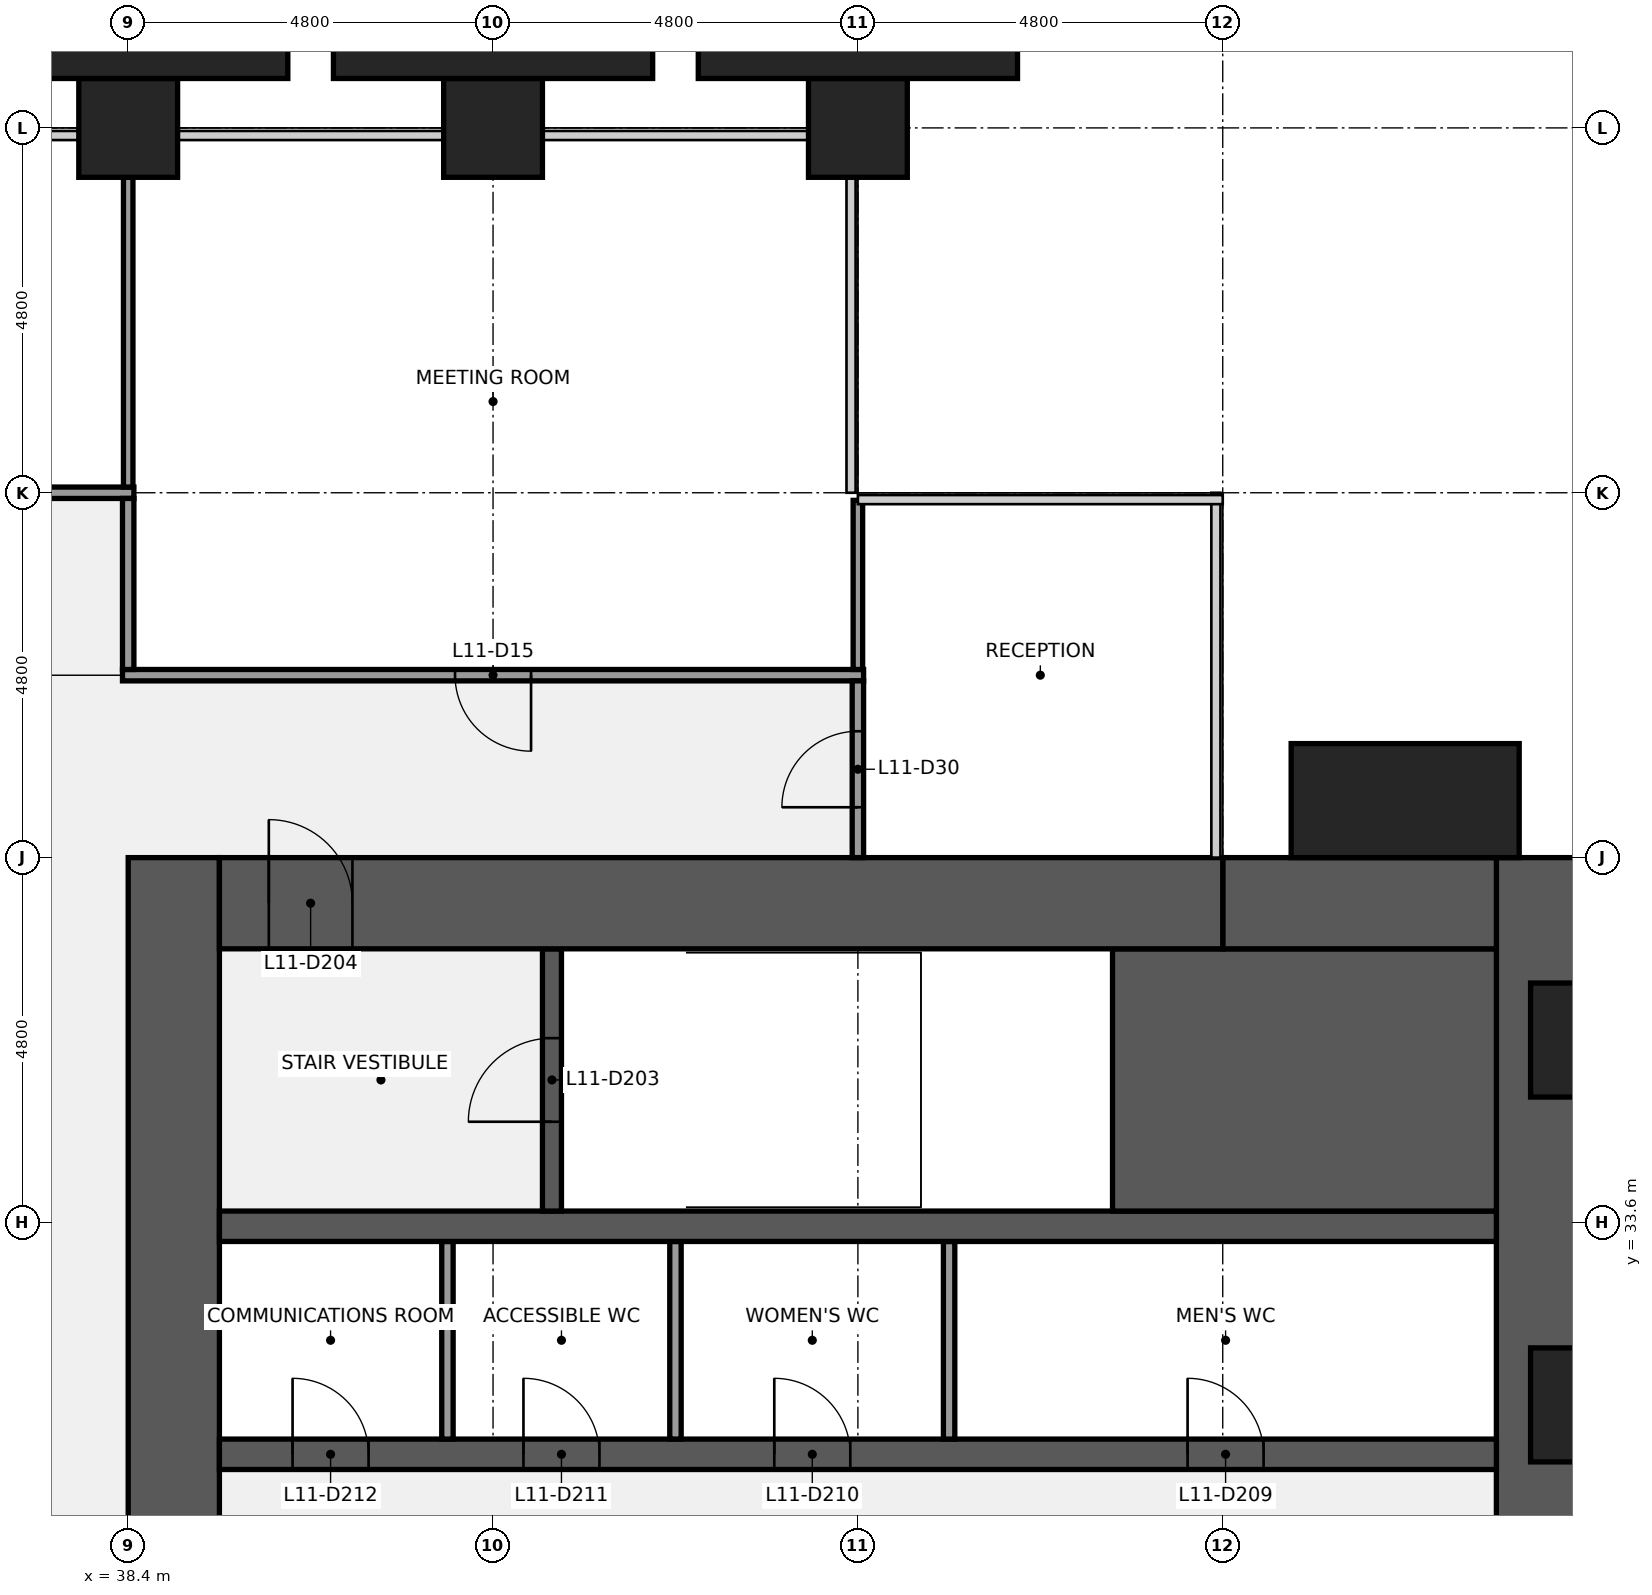
"""IFC4 building model, lengths in metres.
Left out: names, types, materials, properties, quantities, classifications, styles, units other than length and angle.
Written with IfcOpenShell. Run it as: python <this file> out.ifc"""

import sys

from ifc_helpers import new_model, si_unit, direction, frame, frame_2d, origin, origin_2d, place, context, subcontext, project, spatial, rectangle, extrude, element, fill, save


model = new_model("IFC4")
c1 = context("Model", 3, precision=1e-05, world=origin(), true_north=direction((0.0, 1.0)))
c2 = subcontext(c1, "Body", "Model", "MODEL_VIEW")
j1 = project(units=[si_unit("LENGTHUNIT", "METRE"), si_unit("PLANEANGLEUNIT", "RADIAN")], contexts=[c1])
p1 = place(None, origin())
s1 = spatial("IfcSite", under=j1, at=p1, CompositionType="ELEMENT")
p2 = place(p1, origin())
s2 = spatial("IfcBuilding", under=s1, at=p2, CompositionType="ELEMENT")
p3 = place(p2, frame((0.0, 0.0, 55.0)))
s3 = spatial("IfcBuildingStorey", under=s2, at=p3, CompositionType="ELEMENT", Elevation=55.0)
for number, where, z_axis, x_axis in (
    (1, (38.4, 48.0, 0.0), (0.0, 0.0, 1.0), (1.0, 0.0, 0.0)),
    (2, (43.2, 48.0, 0.0), (0.0, 0.0, 1.0), (1.0, 0.0, 0.0)),
    (3, (48.0, 48.0, 0.0), (0.0, 0.0, 1.0), (1.0, 0.0, 0.0)),
):
    element("IfcColumn", number, at=place(p3, frame(where, z_axis=z_axis, x_axis=x_axis)), inside=s3, PredefinedType="COLUMN", context=c2, shape_type="SweptSolid", body=[
        extrude(rectangle(XDim=1.3, YDim=1.3, at=origin_2d()), origin(), (0.0, 0.0, 1.0), 4.0),
    ])
p4 = place(p3, frame((57.0, 38.4, 0.0), z_axis=(0.0, 0.0, 1.0), x_axis=(0.0, -1.0, 0.0)))
e4 = element("IfcWall", 4, at=p4, inside=s3, PredefinedType="SHEAR", context=c2, shape_type="SweptSolid", body=[
    extrude(rectangle(XDim=28.8, YDim=1.2, at=frame_2d((14.4, 0.0))), origin(), (0.0, 0.0, 1.0), 3.84),
])
p5 = place(p4, frame((18.45, 0.0, 0.9)))
e5 = element("IfcOpeningElement", 5, at=p5, cuts=e4, PredefinedType="OPENING", context=c2, shape_type="SweptSolid", body=[
    extrude(rectangle(XDim=1.5, YDim=1.5, at=frame_2d((0.75, 0.75))), frame((0.0, 0.61, 0.0), z_axis=(0.0, -1.0, 0.0), x_axis=(1.0, 0.0, 0.0)), (0.0, 0.0, 1.0), 1.22),
])
p6 = place(p4, frame((8.85, 0.0, 0.9)))
e6 = element("IfcOpeningElement", 6, at=p6, cuts=e4, PredefinedType="OPENING", context=c2, shape_type="SweptSolid", body=[
    extrude(rectangle(XDim=1.5, YDim=1.5, at=frame_2d((0.75, 0.75))), frame((0.0, 0.61, 0.0), z_axis=(0.0, -1.0, 0.0), x_axis=(1.0, 0.0, 0.0)), (0.0, 0.0, 1.0), 1.22),
])
p7 = place(p3, frame((39.0, 9.6, 0.0), z_axis=(0.0, 0.0, 1.0), x_axis=(0.0, 1.0, 0.0)))
e7 = element("IfcWall", 7, at=p7, inside=s3, PredefinedType="SHEAR", context=c2, shape_type="SweptSolid", body=[
    extrude(rectangle(XDim=28.8, YDim=1.2, at=frame_2d((14.4, 0.0))), origin(), (0.0, 0.0, 1.0), 3.84),
])
p8 = place(p7, frame((8.7, 0.0, 0.0)))
e8 = element("IfcOpeningElement", 8, at=p8, cuts=e7, PredefinedType="OPENING", context=c2, shape_type="SweptSolid", body=[
    extrude(rectangle(XDim=1.8, YDim=2.1, at=frame_2d((0.9, 1.05))), frame((0.0, 0.61, 0.0), z_axis=(0.0, -1.0, 0.0), x_axis=(1.0, 0.0, 0.0)), (0.0, 0.0, 1.0), 1.22),
])
p9 = place(p7, frame((18.3, 0.0, 0.0)))
e9 = element("IfcOpeningElement", 9, at=p9, cuts=e7, PredefinedType="OPENING", context=c2, shape_type="SweptSolid", body=[
    extrude(rectangle(XDim=1.8, YDim=2.1, at=frame_2d((0.9, 1.05))), frame((0.0, 0.61, 0.0), z_axis=(0.0, -1.0, 0.0), x_axis=(1.0, 0.0, 0.0)), (0.0, 0.0, 1.0), 1.22),
])
p10 = place(p3, frame((39.6, 30.55, 0.0), z_axis=(0.0, 0.0, 1.0), x_axis=(1.0, 0.0, 0.0)))
e10 = element("IfcWall", 10, at=p10, inside=s3, PredefinedType="SHEAR", context=c2, shape_type="SweptSolid", body=[
    extrude(rectangle(XDim=16.8, YDim=0.4, at=frame_2d((8.4, 0.0))), origin(), (0.0, 0.0, 1.0), 3.84),
])
p11 = place(p10, frame((12.738, 0.0, 0.0)))
e11 = element("IfcOpeningElement", 11, at=p11, cuts=e10, PredefinedType="OPENING", context=c2, shape_type="SweptSolid", body=[
    extrude(rectangle(XDim=1.0, YDim=2.1, at=frame_2d((0.5, 1.05))), frame((0.0, 0.21, 0.0), z_axis=(0.0, -1.0, 0.0), x_axis=(1.0, 0.0, 0.0)), (0.0, 0.0, 1.0), 0.42),
])
p12 = place(p10, frame((7.3, 0.0, 0.0)))
e12 = element("IfcOpeningElement", 12, at=p12, cuts=e10, PredefinedType="OPENING", context=c2, shape_type="SweptSolid", body=[
    extrude(rectangle(XDim=1.0, YDim=2.1, at=frame_2d((0.5, 1.05))), frame((0.0, 0.21, 0.0), z_axis=(0.0, -1.0, 0.0), x_axis=(1.0, 0.0, 0.0)), (0.0, 0.0, 1.0), 0.42),
])
p13 = place(p10, frame((4.0, 0.0, 0.0)))
e13 = element("IfcOpeningElement", 13, at=p13, cuts=e10, PredefinedType="OPENING", context=c2, shape_type="SweptSolid", body=[
    extrude(rectangle(XDim=1.0, YDim=2.1, at=frame_2d((0.5, 1.05))), frame((0.0, 0.21, 0.0), z_axis=(0.0, -1.0, 0.0), x_axis=(1.0, 0.0, 0.0)), (0.0, 0.0, 1.0), 0.42),
])
p14 = place(p10, frame((0.962, 0.0, 0.0)))
e14 = element("IfcOpeningElement", 14, at=p14, cuts=e10, PredefinedType="OPENING", context=c2, shape_type="SweptSolid", body=[
    extrude(rectangle(XDim=1.0, YDim=2.1, at=frame_2d((0.5, 1.05))), frame((0.0, 0.21, 0.0), z_axis=(0.0, -1.0, 0.0), x_axis=(1.0, 0.0, 0.0)), (0.0, 0.0, 1.0), 0.42),
])
for number, where, z_axis, x_axis in (
    (15, (49.2, 30.75, 0.0), (0.0, 0.0, 1.0), (0.0, 1.0, 0.0)),
    (16, (45.6, 30.75, 0.0), (0.0, 0.0, 1.0), (0.0, 1.0, 0.0)),
    (17, (42.6, 30.75, 0.0), (0.0, 0.0, 1.0), (0.0, 1.0, 0.0)),
):
    element("IfcWall", number, at=place(p3, frame(where, z_axis=z_axis, x_axis=x_axis)), inside=s3, PredefinedType="PARTITIONING", context=c2, shape_type="SweptSolid", body=[
        extrude(rectangle(XDim=2.6, YDim=0.15, at=frame_2d((1.3, 0.0))), origin(), (0.0, 0.0, 1.0), 3.84),
    ])
p15 = place(p3, frame((39.6, 33.55, 0.0), z_axis=(0.0, 0.0, 1.0), x_axis=(1.0, 0.0, 0.0)))
e18 = element("IfcWall", 18, at=p15, inside=s3, PredefinedType="SHEAR", context=c2, shape_type="SweptSolid", body=[
    extrude(rectangle(XDim=16.8, YDim=0.4, at=frame_2d((8.4, 0.0))), origin(), (0.0, 0.0, 1.0), 3.84),
])
p16 = place(p3, frame((51.35, 35.475, 0.0), z_axis=(0.0, 0.0, 1.0), x_axis=(1.0, 0.0, 0.0)))
e19 = element("IfcWall", 19, at=p16, inside=s3, PredefinedType="SHEAR", context=c2, shape_type="SweptSolid", body=[
    extrude(rectangle(XDim=5.05, YDim=3.45, at=frame_2d((2.525, 0.0))), origin(), (0.0, 0.0, 1.0), 3.84),
])
p17 = place(p3, frame((43.975, 33.75, 0.0), z_axis=(0.0, 0.0, 1.0), x_axis=(0.0, 1.0, 0.0)))
e20 = element("IfcWall", 20, at=p17, inside=s3, PredefinedType="SHEAR", context=c2, shape_type="SweptSolid", body=[
    extrude(rectangle(XDim=3.45, YDim=0.25, at=frame_2d((1.725, 0.0))), origin(), (0.0, 0.0, 1.0), 3.84),
])
p18 = place(p17, frame((1.175, 0.0, 0.0)))
e21 = element("IfcOpeningElement", 21, at=p18, cuts=e20, PredefinedType="OPENING", context=c2, shape_type="SweptSolid", body=[
    extrude(rectangle(XDim=1.1, YDim=2.1, at=frame_2d((0.55, 1.05))), frame((0.0, 0.135, 0.0), z_axis=(0.0, -1.0, 0.0), x_axis=(1.0, 0.0, 0.0)), (0.0, 0.0, 1.0), 0.27),
])
p19 = place(p3, frame((52.8, 37.8, 0.0), z_axis=(0.0, 0.0, 1.0), x_axis=(1.0, 0.0, 0.0)))
e22 = element("IfcWall", 22, at=p19, inside=s3, PredefinedType="SHEAR", context=c2, shape_type="SweptSolid", body=[
    extrude(rectangle(XDim=3.6, YDim=1.2, at=frame_2d((1.8, 0.0))), origin(), (0.0, 0.0, 1.0), 3.84),
])
p20 = place(p3, frame((39.6, 37.8, 0.0), z_axis=(0.0, 0.0, 1.0), x_axis=(1.0, 0.0, 0.0)))
e23 = element("IfcWall", 23, at=p20, inside=s3, PredefinedType="SHEAR", context=c2, shape_type="SweptSolid", body=[
    extrude(rectangle(XDim=13.2, YDim=1.2, at=frame_2d((6.6, 0.0))), origin(), (0.0, 0.0, 1.0), 3.84),
])
p21 = place(p20, frame((0.65, 0.0, 0.0)))
e24 = element("IfcOpeningElement", 24, at=p21, cuts=e23, PredefinedType="OPENING", context=c2, shape_type="SweptSolid", body=[
    extrude(rectangle(XDim=1.1, YDim=2.1, at=frame_2d((0.55, 1.05))), frame((0.0, 0.61, 0.0), z_axis=(0.0, -1.0, 0.0), x_axis=(1.0, 0.0, 0.0)), (0.0, 0.0, 1.0), 1.22),
])
p22 = place(p3, frame((38.325, 40.8, 0.0), z_axis=(0.0, 0.0, 1.0), x_axis=(1.0, 0.0, 0.0)))
e25 = element("IfcWall", 25, at=p22, inside=s3, PredefinedType="PARTITIONING", context=c2, shape_type="SweptSolid", body=[
    extrude(rectangle(XDim=9.75, YDim=0.15, at=frame_2d((4.875, 0.0))), origin(), (0.0, 0.0, 1.0), 2.849),
])
p23 = place(p22, frame((4.375, 0.0, 0.0)))
e26 = element("IfcOpeningElement", 26, at=p23, cuts=e25, PredefinedType="OPENING", context=c2, shape_type="SweptSolid", body=[
    extrude(rectangle(XDim=1.0, YDim=2.1, at=frame_2d((0.5, 1.05))), frame((0.0, 0.085, 0.0), z_axis=(0.0, -1.0, 0.0), x_axis=(1.0, 0.0, 0.0)), (0.0, 0.0, 1.0), 0.17),
])
p24 = place(p3, frame((19.125, 43.2, 0.0), z_axis=(0.0, 0.0, 1.0), x_axis=(1.0, 0.0, 0.0)))
e27 = element("IfcWall", 27, at=p24, inside=s3, PredefinedType="PARTITIONING", context=c2, shape_type="SweptSolid", body=[
    extrude(rectangle(XDim=19.35, YDim=0.15, at=frame_2d((9.675, 0.0))), origin(), (0.0, 0.0, 1.0), 2.849),
])
p25 = place(p24, frame((4.375, 0.0, 0.0)))
e28 = element("IfcOpeningElement", 28, at=p25, cuts=e27, PredefinedType="OPENING", context=c2, shape_type="SweptSolid", body=[
    extrude(rectangle(XDim=1.0, YDim=2.1, at=frame_2d((0.5, 1.05))), frame((0.0, 0.085, 0.0), z_axis=(0.0, -1.0, 0.0), x_axis=(1.0, 0.0, 0.0)), (0.0, 0.0, 1.0), 0.17),
])
p26 = place(p24, frame((10.375, 0.0, 0.0)))
e29 = element("IfcOpeningElement", 29, at=p26, cuts=e27, PredefinedType="OPENING", context=c2, shape_type="SweptSolid", body=[
    extrude(rectangle(XDim=1.0, YDim=2.1, at=frame_2d((0.5, 1.05))), frame((0.0, 0.085, 0.0), z_axis=(0.0, -1.0, 0.0), x_axis=(1.0, 0.0, 0.0)), (0.0, 0.0, 1.0), 0.17),
])
p27 = place(p24, frame((15.175, 0.0, 0.0)))
e30 = element("IfcOpeningElement", 30, at=p27, cuts=e27, PredefinedType="OPENING", context=c2, shape_type="SweptSolid", body=[
    extrude(rectangle(XDim=1.0, YDim=2.1, at=frame_2d((0.5, 1.05))), frame((0.0, 0.085, 0.0), z_axis=(0.0, -1.0, 0.0), x_axis=(1.0, 0.0, 0.0)), (0.0, 0.0, 1.0), 0.17),
])
p28 = place(p3, frame((38.4, 43.275, 0.0), z_axis=(0.0, 0.0, 1.0), x_axis=(0.0, 1.0, 0.0)))
e31 = element("IfcWall", 31, at=p28, inside=s3, PredefinedType="PARTITIONING", context=c2, shape_type="SweptSolid", body=[
    extrude(rectangle(XDim=4.075, YDim=0.125, at=frame_2d((2.038, 0.0))), origin(), (0.0, 0.0, 1.0), 2.849),
])
p29 = place(p3, frame((38.4, 40.875, 0.0), z_axis=(0.0, 0.0, 1.0), x_axis=(0.0, 1.0, 0.0)))
e32 = element("IfcWall", 32, at=p29, inside=s3, PredefinedType="PARTITIONING", context=c2, shape_type="SweptSolid", body=[
    extrude(rectangle(XDim=2.25, YDim=0.15, at=frame_2d((1.125, 0.0))), origin(), (0.0, 0.0, 1.0), 2.849),
])
p30 = place(p3, frame((48.0, 40.875, 0.0), z_axis=(0.0, 0.0, 1.0), x_axis=(0.0, 1.0, 0.0)))
e33 = element("IfcWall", 33, at=p30, inside=s3, PredefinedType="PARTITIONING", context=c2, shape_type="SweptSolid", body=[
    extrude(rectangle(XDim=2.225, YDim=0.125, at=frame_2d((1.113, 0.0))), origin(), (0.0, 0.0, 1.0), 2.849),
])
p31 = place(p3, frame((48.0, 38.4, 0.0), z_axis=(0.0, 0.0, 1.0), x_axis=(0.0, 1.0, 0.0)))
e34 = element("IfcWall", 34, at=p31, inside=s3, PredefinedType="PARTITIONING", context=c2, shape_type="SweptSolid", body=[
    extrude(rectangle(XDim=2.325, YDim=0.15, at=frame_2d((1.163, 0.0))), origin(), (0.0, 0.0, 1.0), 2.849),
])
p32 = place(p31, frame((0.663, 0.0, 0.0)))
e35 = element("IfcOpeningElement", 35, at=p32, cuts=e34, PredefinedType="OPENING", context=c2, shape_type="SweptSolid", body=[
    extrude(rectangle(XDim=1.0, YDim=2.1, at=frame_2d((0.5, 1.05))), frame((0.0, 0.085, 0.0), z_axis=(0.0, -1.0, 0.0), x_axis=(1.0, 0.0, 0.0)), (0.0, 0.0, 1.0), 0.17),
])
p33 = place(p3, frame((55.2, 39.15, 0.0), z_axis=(0.0, 0.0, 1.0), x_axis=(1.0, 0.0, 0.0)))
e36 = element("IfcColumn", 36, at=p33, inside=s3, PredefinedType="PILASTER", context=c2, shape_type="SweptSolid", body=[
    extrude(rectangle(XDim=3.0, YDim=1.5, at=origin_2d()), origin(), (0.0, 0.0, 1.0), 4.0),
])
for number, where, z_axis, x_axis in (
    (37, (38.4, 49.075, 0.0), (0.0, 0.0, 1.0), (1.0, 0.0, 0.0)),
    (38, (43.2, 49.075, 0.0), (0.0, 0.0, 1.0), (1.0, 0.0, 0.0)),
    (39, (48.0, 49.075, 0.0), (0.0, 0.0, 1.0), (1.0, 0.0, 0.0)),
):
    element("IfcColumn", number, at=place(p3, frame(where, z_axis=z_axis, x_axis=x_axis)), inside=s3, PredefinedType="PILASTER", context=c2, shape_type="SweptSolid", body=[
        extrude(rectangle(XDim=4.2, YDim=0.85, at=origin_2d()), origin(), (0.0, 0.0, 1.0), 4.0),
    ])
p34 = place(p18, origin())
e40 = element("IfcDoor", 40, at=p34, inside=s3, OperationType="SINGLE_SWING_LEFT", PredefinedType="DOOR", context=c2, shape_type="SweptSolid", body=[
    extrude(rectangle(XDim=1.1, YDim=2.1, at=frame_2d((0.55, 1.05))), frame((0.0, 0.025, 0.0), z_axis=(0.0, -1.0, 0.0), x_axis=(1.0, 0.0, 0.0)), (0.0, 0.0, 1.0), 0.05),
])
fill(e21, e40)
p35 = place(p21, origin())
e41 = element("IfcDoor", 41, at=p35, inside=s3, OperationType="SINGLE_SWING_LEFT", PredefinedType="DOOR", context=c2, shape_type="SweptSolid", body=[
    extrude(rectangle(XDim=1.1, YDim=2.1, at=frame_2d((0.55, 1.05))), frame((0.0, 0.025, 0.0), z_axis=(0.0, -1.0, 0.0), x_axis=(1.0, 0.0, 0.0)), (0.0, 0.0, 1.0), 0.05),
])
fill(e24, e41)
p36 = place(p11, origin())
e42 = element("IfcDoor", 42, at=p36, inside=s3, OperationType="SINGLE_SWING_LEFT", PredefinedType="DOOR", context=c2, shape_type="SweptSolid", body=[
    extrude(rectangle(XDim=1.0, YDim=2.1, at=frame_2d((0.5, 1.05))), frame((0.0, 0.025, 0.0), z_axis=(0.0, -1.0, 0.0), x_axis=(1.0, 0.0, 0.0)), (0.0, 0.0, 1.0), 0.05),
])
fill(e11, e42)
p37 = place(p12, origin())
e43 = element("IfcDoor", 43, at=p37, inside=s3, OperationType="SINGLE_SWING_LEFT", PredefinedType="DOOR", context=c2, shape_type="SweptSolid", body=[
    extrude(rectangle(XDim=1.0, YDim=2.1, at=frame_2d((0.5, 1.05))), frame((0.0, 0.025, 0.0), z_axis=(0.0, -1.0, 0.0), x_axis=(1.0, 0.0, 0.0)), (0.0, 0.0, 1.0), 0.05),
])
fill(e12, e43)
p38 = place(p13, origin())
e44 = element("IfcDoor", 44, at=p38, inside=s3, OperationType="SINGLE_SWING_LEFT", PredefinedType="DOOR", context=c2, shape_type="SweptSolid", body=[
    extrude(rectangle(XDim=1.0, YDim=2.1, at=frame_2d((0.5, 1.05))), frame((0.0, 0.025, 0.0), z_axis=(0.0, -1.0, 0.0), x_axis=(1.0, 0.0, 0.0)), (0.0, 0.0, 1.0), 0.05),
])
fill(e13, e44)
p39 = place(p14, origin())
e45 = element("IfcDoor", 45, at=p39, inside=s3, OperationType="SINGLE_SWING_LEFT", PredefinedType="DOOR", context=c2, shape_type="SweptSolid", body=[
    extrude(rectangle(XDim=1.0, YDim=2.1, at=frame_2d((0.5, 1.05))), frame((0.0, 0.025, 0.0), z_axis=(0.0, -1.0, 0.0), x_axis=(1.0, 0.0, 0.0)), (0.0, 0.0, 1.0), 0.05),
])
fill(e14, e45)
p40 = place(p23, origin())
e46 = element("IfcDoor", 46, at=p40, inside=s3, OperationType="SINGLE_SWING_RIGHT", PredefinedType="DOOR", context=c2, shape_type="SweptSolid", body=[
    extrude(rectangle(XDim=1.0, YDim=2.1, at=frame_2d((0.5, 1.05))), frame((0.0, 0.025, 0.0), z_axis=(0.0, -1.0, 0.0), x_axis=(1.0, 0.0, 0.0)), (0.0, 0.0, 1.0), 0.05),
])
fill(e26, e46)
p41 = place(p32, origin())
e47 = element("IfcDoor", 47, at=p41, inside=s3, OperationType="SINGLE_SWING_LEFT", PredefinedType="DOOR", context=c2, shape_type="SweptSolid", body=[
    extrude(rectangle(XDim=1.0, YDim=2.1, at=frame_2d((0.5, 1.05))), frame((0.0, 0.025, 0.0), z_axis=(0.0, -1.0, 0.0), x_axis=(1.0, 0.0, 0.0)), (0.0, 0.0, 1.0), 0.05),
])
fill(e35, e47)
save(model, sys.argv[1])
